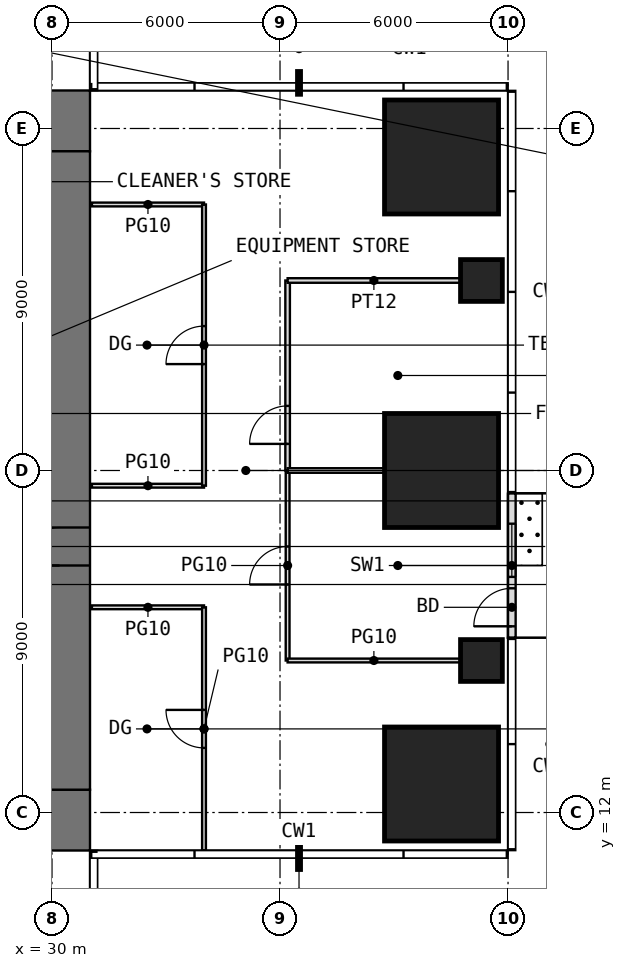
"""IFC4 building model, lengths in metres.
Left out: names, types, materials, properties, quantities, classifications, styles, units other than length and angle.
Written with IfcOpenShell. Run it as: python <this file> out.ifc"""

import sys

from ifc_helpers import new_model, si_unit, direction, frame, frame_2d, origin, origin_2d, place, context, subcontext, project, spatial, rectangle, extrude, element, fill, save


model = new_model("IFC4")
c1 = context("Model", 3, precision=1e-05, world=origin(), true_north=direction((0.0, 1.0)))
c2 = subcontext(c1, "Body", "Model", "MODEL_VIEW")
j1 = project(units=[si_unit("LENGTHUNIT", "METRE"), si_unit("PLANEANGLEUNIT", "RADIAN")], contexts=[c1])
p1 = place(None, origin())
s1 = spatial("IfcSite", under=j1, at=p1, CompositionType="ELEMENT")
p2 = place(p1, origin())
s2 = spatial("IfcBuilding", under=s1, at=p2, CompositionType="ELEMENT")
p3 = place(p2, frame((0.0, 0.0, 136.5)))
s3 = spatial("IfcBuildingStorey", under=s2, at=p3, CompositionType="ELEMENT", Elevation=136.5)
p4 = place(p3, frame((40.25, 12.75, 0.0), z_axis=(0.0, 0.0, 1.0), x_axis=(1.0, 0.0, 0.0)))
e1 = element("IfcColumn", 1, at=p4, inside=s3, PredefinedType="COLUMN", context=c2, shape_type="SweptSolid", body=[
    extrude(rectangle(XDim=3.0, YDim=3.0, at=origin_2d()), origin(), (0.0, 0.0, 1.0), 4.0),
])
p5 = place(p3, frame((41.3, 16.0, 0.0), z_axis=(0.0, 0.0, 1.0), x_axis=(1.0, 0.0, 0.0)))
e2 = element("IfcColumn", 2, at=p5, inside=s3, PredefinedType="COLUMN", context=c2, shape_type="SweptSolid", body=[
    extrude(rectangle(XDim=1.1, YDim=1.1, at=origin_2d()), origin(), (0.0, 0.0, 1.0), 4.0),
])
p6 = place(p3, frame((40.25, 21.0, 0.0), z_axis=(0.0, 0.0, 1.0), x_axis=(1.0, 0.0, 0.0)))
e3 = element("IfcColumn", 3, at=p6, inside=s3, PredefinedType="COLUMN", context=c2, shape_type="SweptSolid", body=[
    extrude(rectangle(XDim=3.0, YDim=3.0, at=origin_2d()), origin(), (0.0, 0.0, 1.0), 4.0),
])
p7 = place(p3, frame((41.3, 26.0, 0.0), z_axis=(0.0, 0.0, 1.0), x_axis=(1.0, 0.0, 0.0)))
e4 = element("IfcColumn", 4, at=p7, inside=s3, PredefinedType="COLUMN", context=c2, shape_type="SweptSolid", body=[
    extrude(rectangle(XDim=1.1, YDim=1.1, at=origin_2d()), origin(), (0.0, 0.0, 1.0), 4.0),
])
p8 = place(p3, frame((40.25, 29.25, 0.0), z_axis=(0.0, 0.0, 1.0), x_axis=(1.0, 0.0, 0.0)))
e5 = element("IfcColumn", 5, at=p8, inside=s3, PredefinedType="COLUMN", context=c2, shape_type="SweptSolid", body=[
    extrude(rectangle(XDim=3.0, YDim=3.0, at=origin_2d()), origin(), (0.0, 0.0, 1.0), 4.0),
])
p9 = place(p3, frame((42.1, 16.6, 0.0), z_axis=(0.0, 0.0, 1.0), x_axis=(0.0, 1.0, 0.0)))
e6 = element("IfcWall", 6, at=p9, inside=s3, PredefinedType="USERDEFINED", context=c2, shape_type="SweptSolid", body=[
    extrude(rectangle(XDim=3.8, YDim=0.2, at=frame_2d((1.9, 0.0))), origin(), (0.0, 0.0, 1.0), 3.75),
])
p10 = place(p9, frame((0.3, 0.0, 0.0)))
e7 = element("IfcOpeningElement", 7, at=p10, cuts=e6, PredefinedType="OPENING", context=c2, shape_type="SweptSolid", body=[
    extrude(rectangle(XDim=1.0, YDim=2.4, at=frame_2d((0.5, 1.2))), frame((0.0, 0.11, 0.0), z_axis=(0.0, -1.0, 0.0), x_axis=(1.0, 0.0, 0.0)), (0.0, 0.0, 1.0), 0.22),
])
p11 = place(p9, frame((1.6, 0.0, 0.3)))
e8 = element("IfcOpeningElement", 8, at=p11, cuts=e6, PredefinedType="OPENING", context=c2, shape_type="SweptSolid", body=[
    extrude(rectangle(XDim=1.4, YDim=2.7, at=frame_2d((0.7, 1.35))), frame((0.0, 0.11, 0.0), z_axis=(0.0, -1.0, 0.0), x_axis=(1.0, 0.0, 0.0)), (0.0, 0.0, 1.0), 0.22),
])
p12 = place(p3, frame((11.0, 11.8, -0.05), z_axis=(0.0, 0.0, 1.0), x_axis=(1.0, 0.0, 0.0)))
e9 = element("IfcWall", 9, at=p12, inside=s3, PredefinedType="SHEAR", context=c2, shape_type="SweptSolid", body=[
    extrude(rectangle(XDim=20.0, YDim=1.6, at=frame_2d((10.0, 0.0))), origin(), (0.0, 0.0, 1.0), 4.0),
])
p13 = place(p12, frame((9.0, 0.0, 0.05)))
e10 = element("IfcOpeningElement", 10, at=p13, cuts=e9, PredefinedType="OPENING", context=c2, shape_type="SweptSolid", body=[
    extrude(rectangle(XDim=2.0, YDim=2.2, at=frame_2d((1.0, 1.1))), frame((0.0, 0.81, 0.0), z_axis=(0.0, -1.0, 0.0), x_axis=(1.0, 0.0, 0.0)), (0.0, 0.0, 1.0), 1.62),
])
p14 = place(p3, frame((11.0, 30.2, -0.05), z_axis=(0.0, 0.0, 1.0), x_axis=(1.0, 0.0, 0.0)))
e11 = element("IfcWall", 11, at=p14, inside=s3, PredefinedType="SHEAR", context=c2, shape_type="SweptSolid", body=[
    extrude(rectangle(XDim=20.0, YDim=1.6, at=frame_2d((10.0, 0.0))), origin(), (0.0, 0.0, 1.0), 4.0),
])
p15 = place(p14, frame((9.0, 0.0, 0.05)))
e12 = element("IfcOpeningElement", 12, at=p15, cuts=e11, PredefinedType="OPENING", context=c2, shape_type="SweptSolid", body=[
    extrude(rectangle(XDim=2.0, YDim=2.2, at=frame_2d((1.0, 1.1))), frame((0.0, 0.81, 0.0), z_axis=(0.0, -1.0, 0.0), x_axis=(1.0, 0.0, 0.0)), (0.0, 0.0, 1.0), 1.62),
])
p16 = place(p3, frame((30.2, 12.6, -0.05), z_axis=(0.0, 0.0, 1.0), x_axis=(0.0, 1.0, 0.0)))
e13 = element("IfcWall", 13, at=p16, inside=s3, PredefinedType="SHEAR", context=c2, shape_type="SweptSolid", body=[
    extrude(rectangle(XDim=16.8, YDim=1.6, at=frame_2d((8.4, 0.0))), origin(), (0.0, 0.0, 1.0), 4.0),
])
p17 = place(p16, frame((5.9, 0.0, 0.05)))
e14 = element("IfcOpeningElement", 14, at=p17, cuts=e13, PredefinedType="OPENING", context=c2, shape_type="SweptSolid", body=[
    extrude(rectangle(XDim=1.0, YDim=2.2, at=frame_2d((0.5, 1.1))), frame((0.0, 0.81, 0.0), z_axis=(0.0, -1.0, 0.0), x_axis=(1.0, 0.0, 0.0)), (0.0, 0.0, 1.0), 1.62),
])
for number, where, z_axis, x_axis in (
    (15, (31.05, 17.4, 0.0), (0.0, 0.0, 1.0), (1.0, 0.0, 0.0)),
    (16, (31.05, 20.6, 0.0), (0.0, 0.0, 1.0), (1.0, 0.0, 0.0)),
    (17, (31.05, 28.0, 0.0), (0.0, 0.0, 1.0), (1.0, 0.0, 0.0)),
):
    element("IfcWall", number, at=place(p3, frame(where, z_axis=z_axis, x_axis=x_axis)), inside=s3, PredefinedType="PARTITIONING", context=c2, shape_type="SweptSolid", body=[
        extrude(rectangle(XDim=2.95, YDim=0.1, at=frame_2d((1.475, 0.0))), origin(), (0.0, 0.0, 1.0), 3.75),
    ])
p18 = place(p3, frame((34.0, 11.0, 0.0), z_axis=(0.0, 0.0, 1.0), x_axis=(0.0, 1.0, 0.0)))
e18 = element("IfcWall", 18, at=p18, inside=s3, PredefinedType="PARTITIONING", context=c2, shape_type="SweptSolid", body=[
    extrude(rectangle(XDim=6.4, YDim=0.1, at=frame_2d((3.2, 0.0))), origin(), (0.0, 0.0, 1.0), 3.75),
])
p19 = place(p18, frame((2.7, 0.0, 0.0)))
e19 = element("IfcOpeningElement", 19, at=p19, cuts=e18, PredefinedType="OPENING", context=c2, shape_type="SweptSolid", body=[
    extrude(rectangle(XDim=1.0, YDim=2.4, at=frame_2d((0.5, 1.2))), frame((0.0, 0.06, 0.0), z_axis=(0.0, -1.0, 0.0), x_axis=(1.0, 0.0, 0.0)), (0.0, 0.0, 1.0), 0.12),
])
p20 = place(p3, frame((34.0, 20.6, 0.0), z_axis=(0.0, 0.0, 1.0), x_axis=(0.0, 1.0, 0.0)))
e20 = element("IfcWall", 20, at=p20, inside=s3, PredefinedType="PARTITIONING", context=c2, shape_type="SweptSolid", body=[
    extrude(rectangle(XDim=7.4, YDim=0.1, at=frame_2d((3.7, 0.0))), origin(), (0.0, 0.0, 1.0), 3.75),
])
p21 = place(p20, frame((3.2, 0.0, 0.0)))
e21 = element("IfcOpeningElement", 21, at=p21, cuts=e20, PredefinedType="OPENING", context=c2, shape_type="SweptSolid", body=[
    extrude(rectangle(XDim=1.0, YDim=2.4, at=frame_2d((0.5, 1.2))), frame((0.0, 0.06, 0.0), z_axis=(0.0, -1.0, 0.0), x_axis=(1.0, 0.0, 0.0)), (0.0, 0.0, 1.0), 0.12),
])
p22 = place(p3, frame((36.2, 16.0, 0.0), z_axis=(0.0, 0.0, 1.0), x_axis=(0.0, 1.0, 0.0)))
e22 = element("IfcWall", 22, at=p22, inside=s3, PredefinedType="PARTITIONING", context=c2, shape_type="SweptSolid", body=[
    extrude(rectangle(XDim=5.0, YDim=0.1, at=frame_2d((2.5, 0.0))), origin(), (0.0, 0.0, 1.0), 3.75),
])
p23 = place(p22, frame((2.0, 0.0, 0.0)))
e23 = element("IfcOpeningElement", 23, at=p23, cuts=e22, PredefinedType="OPENING", context=c2, shape_type="SweptSolid", body=[
    extrude(rectangle(XDim=1.0, YDim=2.4, at=frame_2d((0.5, 1.2))), frame((0.0, 0.06, 0.0), z_axis=(0.0, -1.0, 0.0), x_axis=(1.0, 0.0, 0.0)), (0.0, 0.0, 1.0), 0.12),
])
p24 = place(p3, frame((36.2, 16.0, 0.0), z_axis=(0.0, 0.0, 1.0), x_axis=(1.0, 0.0, 0.0)))
e24 = element("IfcWall", 24, at=p24, inside=s3, PredefinedType="PARTITIONING", context=c2, shape_type="SweptSolid", body=[
    extrude(rectangle(XDim=4.54, YDim=0.1, at=frame_2d((2.27, 0.0))), origin(), (0.0, 0.0, 1.0), 3.75),
])
p25 = place(p3, frame((36.2, 21.0, 0.0), z_axis=(0.0, 0.0, 1.0), x_axis=(0.0, 1.0, 0.0)))
e25 = element("IfcWall", 25, at=p25, inside=s3, PredefinedType="PARTITIONING", context=c2, shape_type="SweptSolid", body=[
    extrude(rectangle(XDim=5.0, YDim=0.12, at=frame_2d((2.5, 0.0))), origin(), (0.0, 0.0, 1.0), 3.75),
])
p26 = place(p25, frame((0.7, 0.0, 0.0)))
e26 = element("IfcOpeningElement", 26, at=p26, cuts=e25, PredefinedType="OPENING", context=c2, shape_type="SweptSolid", body=[
    extrude(rectangle(XDim=1.0, YDim=2.2, at=frame_2d((0.5, 1.1))), frame((0.0, 0.07, 0.0), z_axis=(0.0, -1.0, 0.0), x_axis=(1.0, 0.0, 0.0)), (0.0, 0.0, 1.0), 0.14),
])
p27 = place(p3, frame((36.2, 21.0, 0.0), z_axis=(0.0, 0.0, 1.0), x_axis=(1.0, 0.0, 0.0)))
e27 = element("IfcWall", 27, at=p27, inside=s3, PredefinedType="PARTITIONING", context=c2, shape_type="SweptSolid", body=[
    extrude(rectangle(XDim=2.54, YDim=0.12, at=frame_2d((1.27, 0.0))), origin(), (0.0, 0.0, 1.0), 3.75),
])
p28 = place(p3, frame((36.2, 26.0, 0.0), z_axis=(0.0, 0.0, 1.0), x_axis=(1.0, 0.0, 0.0)))
e28 = element("IfcWall", 28, at=p28, inside=s3, PredefinedType="PARTITIONING", context=c2, shape_type="SweptSolid", body=[
    extrude(rectangle(XDim=4.54, YDim=0.12, at=frame_2d((2.27, 0.0))), origin(), (0.0, 0.0, 1.0), 3.75),
])
p29 = place(p10, origin())
e29 = element("IfcDoor", 29, at=p29, inside=s3, OperationType="SINGLE_SWING_LEFT", PredefinedType="DOOR", context=c2, shape_type="SweptSolid", body=[
    extrude(rectangle(XDim=1.0, YDim=2.4, at=frame_2d((0.5, 1.2))), frame((0.0, 0.025, 0.0), z_axis=(0.0, -1.0, 0.0), x_axis=(1.0, 0.0, 0.0)), (0.0, 0.0, 1.0), 0.05),
])
fill(e7, e29)
p30 = place(p11, origin())
e30 = element("IfcWindow", 30, at=p30, inside=s3, PartitioningType="SINGLE_PANEL", PredefinedType="WINDOW", context=c2, shape_type="SweptSolid", body=[
    extrude(rectangle(XDim=1.4, YDim=2.7, at=frame_2d((0.7, 1.35))), frame((0.0, 0.03, 0.0), z_axis=(0.0, -1.0, 0.0), x_axis=(1.0, 0.0, 0.0)), (0.0, 0.0, 1.0), 0.06),
])
fill(e8, e30)
p31 = place(p17, origin())
e31 = element("IfcDoor", 31, at=p31, inside=s3, OperationType="SINGLE_SWING_LEFT", PredefinedType="DOOR", context=c2, shape_type="SweptSolid", body=[
    extrude(rectangle(XDim=1.0, YDim=2.2, at=frame_2d((0.5, 1.1))), frame((0.0, 0.025, 0.0), z_axis=(0.0, -1.0, 0.0), x_axis=(1.0, 0.0, 0.0)), (0.0, 0.0, 1.0), 0.05),
])
fill(e14, e31)
p32 = place(p19, origin())
e32 = element("IfcDoor", 32, at=p32, inside=s3, OperationType="SINGLE_SWING_RIGHT", PredefinedType="DOOR", context=c2, shape_type="SweptSolid", body=[
    extrude(rectangle(XDim=1.0, YDim=2.4, at=frame_2d((0.5, 1.2))), frame((0.0, 0.025, 0.0), z_axis=(0.0, -1.0, 0.0), x_axis=(1.0, 0.0, 0.0)), (0.0, 0.0, 1.0), 0.05),
])
fill(e19, e32)
p33 = place(p21, origin())
e33 = element("IfcDoor", 33, at=p33, inside=s3, OperationType="SINGLE_SWING_LEFT", PredefinedType="DOOR", context=c2, shape_type="SweptSolid", body=[
    extrude(rectangle(XDim=1.0, YDim=2.4, at=frame_2d((0.5, 1.2))), frame((0.0, 0.025, 0.0), z_axis=(0.0, -1.0, 0.0), x_axis=(1.0, 0.0, 0.0)), (0.0, 0.0, 1.0), 0.05),
])
fill(e21, e33)
p34 = place(p23, origin())
e34 = element("IfcDoor", 34, at=p34, inside=s3, OperationType="SINGLE_SWING_LEFT", PredefinedType="DOOR", context=c2, shape_type="SweptSolid", body=[
    extrude(rectangle(XDim=1.0, YDim=2.4, at=frame_2d((0.5, 1.2))), frame((0.0, 0.025, 0.0), z_axis=(0.0, -1.0, 0.0), x_axis=(1.0, 0.0, 0.0)), (0.0, 0.0, 1.0), 0.05),
])
fill(e23, e34)
p35 = place(p26, origin())
e35 = element("IfcDoor", 35, at=p35, inside=s3, OperationType="SINGLE_SWING_LEFT", PredefinedType="DOOR", context=c2, shape_type="SweptSolid", body=[
    extrude(rectangle(XDim=1.0, YDim=2.2, at=frame_2d((0.5, 1.1))), frame((0.0, 0.025, 0.0), z_axis=(0.0, -1.0, 0.0), x_axis=(1.0, 0.0, 0.0)), (0.0, 0.0, 1.0), 0.05),
])
fill(e26, e35)
save(model, sys.argv[1])
